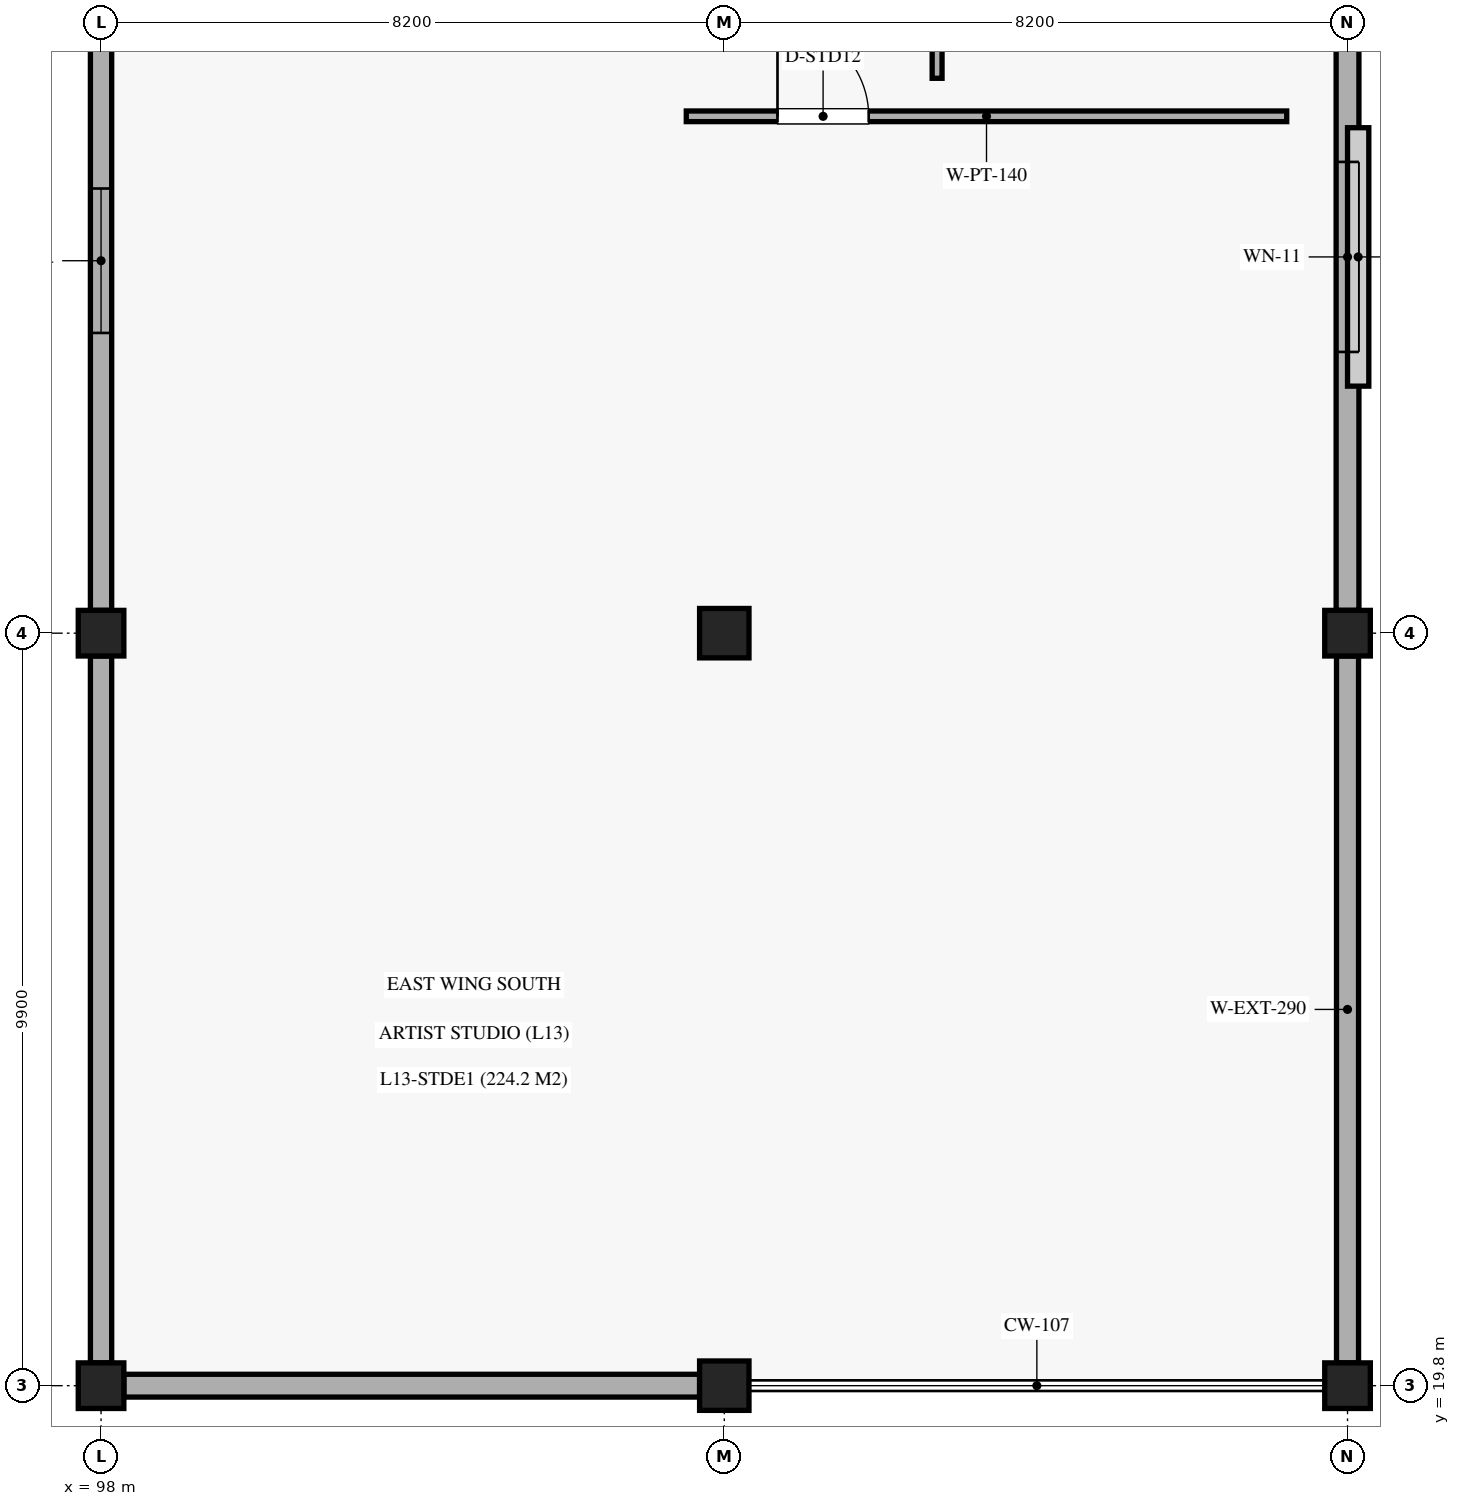
"""IFC4 building model, lengths in metres.
Left out: names, types, materials, properties, quantities, classifications, styles, units other than length and angle.
Written with IfcOpenShell. Run it as: python <this file> out.ifc"""

import sys

from ifc_helpers import new_model, si_unit, direction, frame, frame_2d, origin, origin_2d, place, context, subcontext, project, spatial, rectangle, extrude, element, fill, save


model = new_model("IFC4")
c1 = context("Model", 3, precision=1e-05, world=origin(), true_north=direction((0.0, 1.0)))
c2 = subcontext(c1, "Body", "Model", "MODEL_VIEW")
j1 = project(units=[si_unit("LENGTHUNIT", "METRE"), si_unit("PLANEANGLEUNIT", "RADIAN")], contexts=[c1])
p1 = place(None, origin())
s1 = spatial("IfcSite", under=j1, at=p1, CompositionType="ELEMENT")
p2 = place(p1, origin())
s2 = spatial("IfcBuilding", under=s1, at=p2, CompositionType="ELEMENT")
p3 = place(p2, frame((0.0, 0.0, 66.3)))
s3 = spatial("IfcBuildingStorey", under=s2, at=p3, CompositionType="ELEMENT", Elevation=66.3)
for number, where, z_axis, x_axis in (
    (1, (98.0, 19.8, 0.0), (0.0, 0.0, 1.0), (1.0, 0.0, 0.0)),
    (2, (98.0, 29.7, 0.0), (0.0, 0.0, 1.0), (1.0, 0.0, 0.0)),
):
    element("IfcColumn", number, at=place(p3, frame(where, z_axis=z_axis, x_axis=x_axis)), inside=s3, PredefinedType="COLUMN", context=c2, shape_type="SweptSolid", body=[
        extrude(rectangle(XDim=0.6, YDim=0.6, at=origin_2d()), origin(), (0.0, 0.0, 1.0), 4.08),
    ])
for number, where, z_axis, x_axis in (
    (3, (106.2, 19.8, 0.0), (0.0, 0.0, 1.0), (1.0, 0.0, 0.0)),
    (4, (106.2, 29.7, 0.0), (0.0, 0.0, 1.0), (1.0, 0.0, 0.0)),
):
    element("IfcColumn", number, at=place(p3, frame(where, z_axis=z_axis, x_axis=x_axis)), inside=s3, PredefinedType="COLUMN", context=c2, shape_type="SweptSolid", body=[
        extrude(rectangle(XDim=0.65, YDim=0.65, at=origin_2d()), origin(), (0.0, 0.0, 1.0), 4.08),
    ])
for number, where, z_axis, x_axis in (
    (5, (114.4, 19.8, 0.0), (0.0, 0.0, 1.0), (1.0, 0.0, 0.0)),
    (6, (114.4, 29.7, 0.0), (0.0, 0.0, 1.0), (1.0, 0.0, 0.0)),
):
    element("IfcColumn", number, at=place(p3, frame(where, z_axis=z_axis, x_axis=x_axis)), inside=s3, PredefinedType="COLUMN", context=c2, shape_type="SweptSolid", body=[
        extrude(rectangle(XDim=0.6, YDim=0.6, at=origin_2d()), origin(), (0.0, 0.0, 1.0), 4.08),
    ])
p4 = place(p3, frame((98.0, 20.1, 0.0), z_axis=(0.0, 0.0, 1.0), x_axis=(0.0, 1.0, 0.0)))
e7 = element("IfcWall", 7, at=p4, inside=s3, PredefinedType="SOLIDWALL", context=c2, shape_type="SweptSolid", body=[
    extrude(rectangle(XDim=9.3, YDim=0.28, at=frame_2d((4.65, 0.0))), origin(), (0.0, 0.0, 1.0), 3.08),
])
p5 = place(p3, frame((114.4, 20.1, 0.0), z_axis=(0.0, 0.0, 1.0), x_axis=(0.0, 1.0, 0.0)))
e8 = element("IfcWall", 8, at=p5, inside=s3, PredefinedType="SOLIDWALL", context=c2, shape_type="SweptSolid", body=[
    extrude(rectangle(XDim=9.3, YDim=0.29, at=frame_2d((4.65, 0.0))), origin(), (0.0, 0.0, 1.0), 3.08),
])
p6 = place(p3, frame((98.0, 30.0, 0.0), z_axis=(0.0, 0.0, 1.0), x_axis=(0.0, 1.0, 0.0)))
e9 = element("IfcWall", 9, at=p6, inside=s3, PredefinedType="SOLIDWALL", context=c2, shape_type="SweptSolid", body=[
    extrude(rectangle(XDim=9.3, YDim=0.28, at=frame_2d((4.65, 0.0))), origin(), (0.0, 0.0, 1.0), 3.08),
])
p7 = place(p6, frame((3.65, 0.0, 1.15)))
e10 = element("IfcOpeningElement", 10, at=p7, cuts=e9, PredefinedType="OPENING", context=c2, shape_type="SweptSolid", body=[
    extrude(rectangle(XDim=1.9, YDim=1.45, at=frame_2d((0.95, 0.725))), frame((0.0, 0.15, 0.0), z_axis=(0.0, -1.0, 0.0), x_axis=(1.0, 0.0, 0.0)), (0.0, 0.0, 1.0), 0.3),
])
p8 = place(p3, frame((114.4, 30.0, 0.0), z_axis=(0.0, 0.0, 1.0), x_axis=(0.0, 1.0, 0.0)))
e11 = element("IfcWall", 11, at=p8, inside=s3, PredefinedType="SOLIDWALL", context=c2, shape_type="SweptSolid", body=[
    extrude(rectangle(XDim=9.3, YDim=0.3, at=frame_2d((4.65, 0.0))), origin(), (0.0, 0.0, 1.0), 3.08),
])
p9 = place(p8, frame((3.4, 0.0, 1.15)))
e12 = element("IfcOpeningElement", 12, at=p9, cuts=e11, PredefinedType="OPENING", context=c2, shape_type="SweptSolid", body=[
    extrude(rectangle(XDim=2.5, YDim=1.6, at=frame_2d((1.25, 0.8))), frame((0.0, 0.16, 0.0), z_axis=(0.0, -1.0, 0.0), x_axis=(1.0, 0.0, 0.0)), (0.0, 0.0, 1.0), 0.32),
])
p10 = place(p3, frame((98.3, 19.8, 0.0), z_axis=(0.0, 0.0, 1.0), x_axis=(1.0, 0.0, 0.0)))
e13 = element("IfcWall", 13, at=p10, inside=s3, PredefinedType="SOLIDWALL", context=c2, shape_type="SweptSolid", body=[
    extrude(rectangle(XDim=7.575, YDim=0.3, at=frame_2d((3.788, 0.0))), origin(), (0.0, 0.0, 1.0), 3.08),
])
p11 = place(p3, frame((105.7, 36.5, 0.0), z_axis=(0.0, 0.0, 1.0), x_axis=(1.0, 0.0, 0.0)))
e14 = element("IfcWall", 14, at=p11, inside=s3, PredefinedType="PARTITIONING", context=c2, shape_type="SweptSolid", body=[
    extrude(rectangle(XDim=7.9, YDim=0.14, at=frame_2d((3.95, 0.0))), origin(), (0.0, 0.0, 1.0), 2.95),
])
p12 = place(p11, frame((1.2, 0.0, 0.0)))
e15 = element("IfcOpeningElement", 15, at=p12, cuts=e14, PredefinedType="OPENING", context=c2, shape_type="SweptSolid", body=[
    extrude(rectangle(XDim=1.2, YDim=2.25, at=frame_2d((0.6, 1.125))), frame((0.0, 0.08, 0.0), z_axis=(0.0, -1.0, 0.0), x_axis=(1.0, 0.0, 0.0)), (0.0, 0.0, 1.0), 0.16),
])
p13 = place(p3, frame((109.0, 37.0, 0.0), z_axis=(0.0, 0.0, 1.0), x_axis=(0.0, 1.0, 0.0)))
e16 = element("IfcWall", 16, at=p13, inside=s3, PredefinedType="PARTITIONING", context=c2, shape_type="SweptSolid", body=[
    extrude(rectangle(XDim=24.0, YDim=0.13, at=frame_2d((12.0, 0.0))), origin(), (0.0, 0.0, 1.0), 2.95),
])
p14 = place(p13, frame((8.0, 0.0, 0.0)))
e17 = element("IfcOpeningElement", 17, at=p14, cuts=e16, PredefinedType="OPENING", context=c2, shape_type="SweptSolid", body=[
    extrude(rectangle(XDim=1.2, YDim=2.25, at=frame_2d((0.6, 1.125))), frame((0.0, 0.075, 0.0), z_axis=(0.0, -1.0, 0.0), x_axis=(1.0, 0.0, 0.0)), (0.0, 0.0, 1.0), 0.15),
])
p15 = place(p7, origin())
e18 = element("IfcWindow", 18, at=p15, inside=s3, PartitioningType="SINGLE_PANEL", PredefinedType="WINDOW", context=c2, shape_type="SweptSolid", body=[
    extrude(rectangle(XDim=1.9, YDim=1.45, at=frame_2d((0.95, 0.725))), frame((0.0, 0.03, 0.0), z_axis=(0.0, -1.0, 0.0), x_axis=(1.0, 0.0, 0.0)), (0.0, 0.0, 1.0), 0.06),
])
fill(e10, e18)
p16 = place(p9, origin())
e19 = element("IfcWindow", 19, at=p16, inside=s3, PartitioningType="SINGLE_PANEL", PredefinedType="WINDOW", context=c2, shape_type="SweptSolid", body=[
    extrude(rectangle(XDim=2.5, YDim=1.6, at=frame_2d((1.25, 0.8))), frame((0.0, 0.03, 0.0), z_axis=(0.0, -1.0, 0.0), x_axis=(1.0, 0.0, 0.0)), (0.0, 0.0, 1.0), 0.06),
])
fill(e12, e19)
p17 = place(p12, origin())
e20 = element("IfcDoor", 20, at=p17, inside=s3, OperationType="SINGLE_SWING_LEFT", PredefinedType="DOOR", context=c2, shape_type="SweptSolid", body=[
    extrude(rectangle(XDim=1.2, YDim=2.25, at=frame_2d((0.6, 1.125))), frame((0.0, 0.025, 0.0), z_axis=(0.0, -1.0, 0.0), x_axis=(1.0, 0.0, 0.0)), (0.0, 0.0, 1.0), 0.05),
])
fill(e15, e20)
save(model, sys.argv[1])
